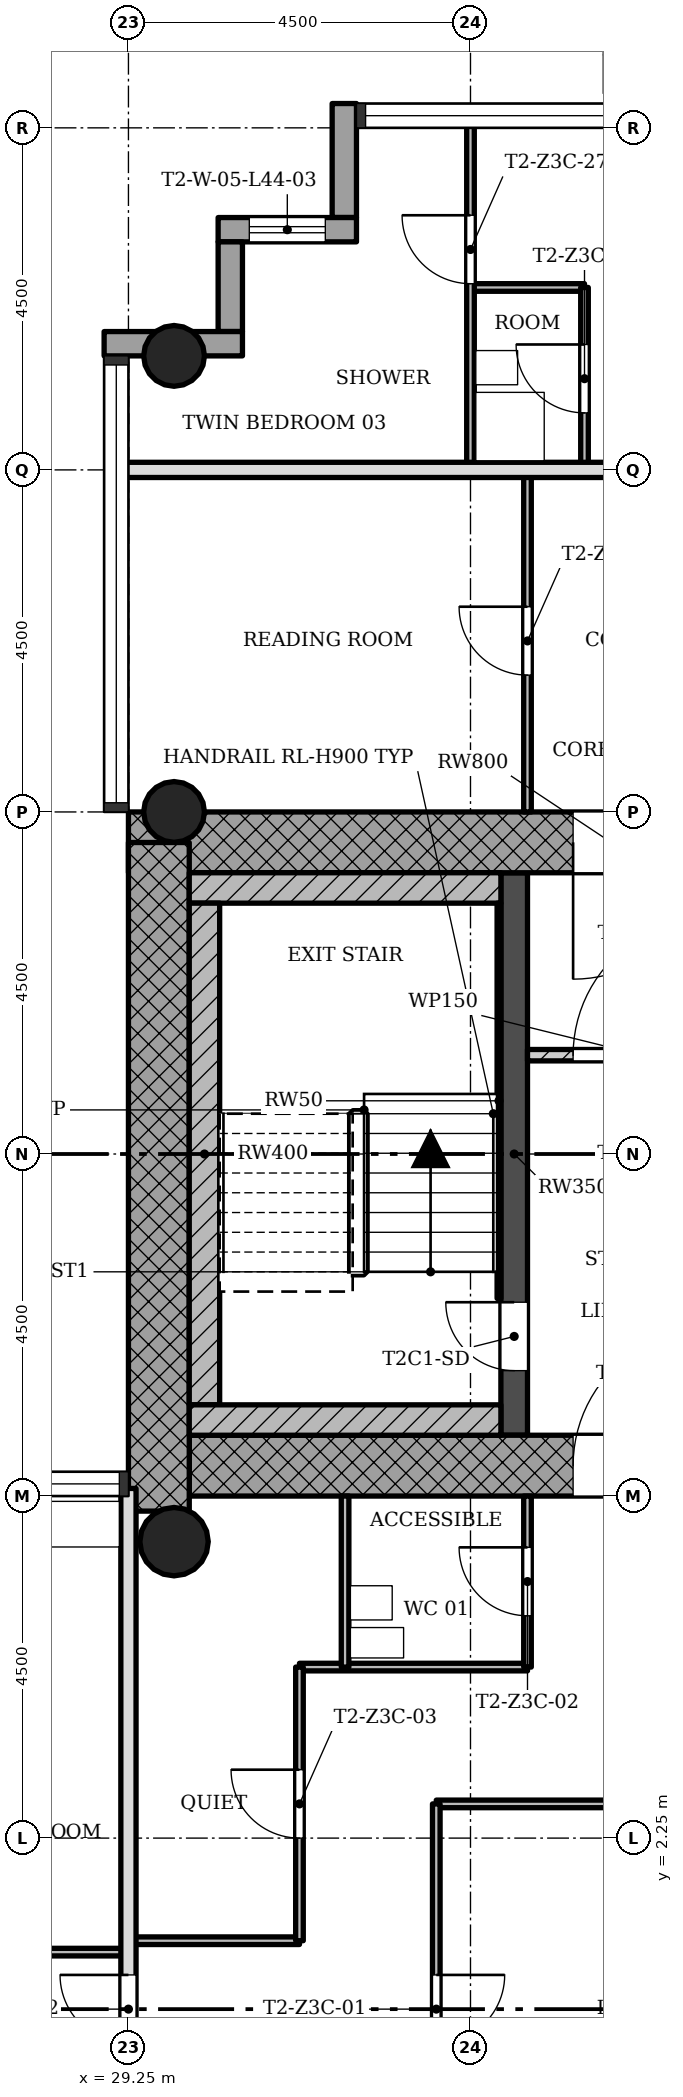
"""IFC4 building model, lengths in metres.
Left out: names, types, materials, properties, quantities, classifications, styles, units other than length and angle.
Written with IfcOpenShell. Run it as: python <this file> out.ifc"""

import sys

from ifc_helpers import new_model, si_unit, direction, frame, frame_2d, origin, origin_2d, place, context, subcontext, project, spatial, rectangle, hollow_circle, extrude, element, fill, save


model = new_model("IFC4")
c1 = context("Model", 3, precision=1e-05, world=origin(), true_north=direction((0.0, 1.0)))
c2 = subcontext(c1, "Body", "Model", "MODEL_VIEW")
j1 = project(units=[si_unit("LENGTHUNIT", "METRE"), si_unit("PLANEANGLEUNIT", "RADIAN")], contexts=[c1])
p1 = place(None, origin())
s1 = spatial("IfcSite", under=j1, at=p1, CompositionType="ELEMENT")
p2 = place(p1, origin())
s2 = spatial("IfcBuilding", under=s1, at=p2, CompositionType="ELEMENT")
p3 = place(p2, frame((0.0, 0.0, 160.9)))
s3 = spatial("IfcBuildingStorey", under=s2, at=p3, CompositionType="ELEMENT", Elevation=160.9)
p4 = place(p3, frame((30.05, 7.15, 0.0), z_axis=(0.0, 0.0, 1.0), x_axis=(1.0, 0.0, 0.0)))
e1 = element("IfcWall", 1, at=p4, inside=s3, PredefinedType="SHEAR", context=c2, shape_type="SweptSolid", body=[
    extrude(rectangle(XDim=12.7, YDim=0.8, at=frame_2d((6.35, 0.0))), origin(), (0.0, 0.0, 1.0), 3.4),
])
p5 = place(p4, frame((5.05, 0.0, 0.0)))
e2 = element("IfcOpeningElement", 2, at=p5, cuts=e1, PredefinedType="OPENING", context=c2, shape_type="SweptSolid", body=[
    extrude(rectangle(XDim=1.8, YDim=2.1, at=frame_2d((0.9, 1.05))), frame((0.0, 0.41, 0.0), z_axis=(0.0, -1.0, 0.0), x_axis=(1.0, 0.0, 0.0)), (0.0, 0.0, 1.0), 0.82),
])
p6 = place(p3, frame((41.95, 15.35, 0.0), z_axis=(0.0, 0.0, 1.0), x_axis=(-1.0, 0.0, 0.0)))
e3 = element("IfcWall", 3, at=p6, inside=s3, PredefinedType="SHEAR", context=c2, shape_type="SweptSolid", body=[
    extrude(rectangle(XDim=12.7, YDim=0.8, at=frame_2d((6.35, 0.0))), origin(), (0.0, 0.0, 1.0), 3.4),
])
p7 = place(p6, frame((5.05, 0.0, 0.0)))
e4 = element("IfcOpeningElement", 4, at=p7, cuts=e3, PredefinedType="OPENING", context=c2, shape_type="SweptSolid", body=[
    extrude(rectangle(XDim=1.8, YDim=2.1, at=frame_2d((0.9, 1.05))), frame((0.0, 0.41, 0.0), z_axis=(0.0, -1.0, 0.0), x_axis=(1.0, 0.0, 0.0)), (0.0, 0.0, 1.0), 0.82),
])
p8 = place(p3, frame((29.65, 15.348, 0.0), z_axis=(0.0, 0.0, 1.0), x_axis=(0.0, -1.0, 0.0)))
e5 = element("IfcWall", 5, at=p8, inside=s3, PredefinedType="SHEAR", context=c2, shape_type="SweptSolid", body=[
    extrude(rectangle(XDim=8.796, YDim=0.8, at=frame_2d((4.398, 0.0))), origin(), (0.0, 0.0, 1.0), 3.4),
])
p9 = place(p3, frame((34.325, 7.55, 0.0), z_axis=(0.0, 0.0, 1.0), x_axis=(0.0, 1.0, 0.0)))
e6 = element("IfcWall", 6, at=p9, inside=s3, PredefinedType="SHEAR", context=c2, shape_type="SweptSolid", body=[
    extrude(rectangle(XDim=7.4, YDim=0.35, at=frame_2d((3.7, 0.0))), origin(), (0.0, 0.0, 1.0), 3.4),
])
p10 = place(p9, frame((0.85, 0.0, 0.0)))
e7 = element("IfcOpeningElement", 7, at=p10, cuts=e6, PredefinedType="OPENING", context=c2, shape_type="SweptSolid", body=[
    extrude(rectangle(XDim=0.9, YDim=2.1, at=frame_2d((0.45, 1.05))), frame((0.0, 0.185, 0.0), z_axis=(0.0, -1.0, 0.0), x_axis=(1.0, 0.0, 0.0)), (0.0, 0.0, 1.0), 0.37),
])
for number, where, z_axis, x_axis in (
    (8, (29.85, 15.75, 0.0), (0.0, 0.0, 1.0), (1.0, 0.0, 0.0)),
    (9, (29.85, 21.75, 0.0), (0.0, 0.0, 1.0), (1.0, 0.0, 0.0)),
):
    element("IfcColumn", number, at=place(p3, frame(where, z_axis=z_axis, x_axis=x_axis)), inside=s3, PredefinedType="COLUMN", context=c2, shape_type="SweptSolid", body=[
        extrude(hollow_circle(Radius=0.4, WallThickness=0.028, at=origin_2d()), origin(), (0.0, 0.0, 1.0), 3.4),
    ])
p11 = place(p3, frame((29.85, 6.15, 0.0), z_axis=(0.0, 0.0, 1.0), x_axis=(1.0, 0.0, 0.0)))
e10 = element("IfcColumn", 10, at=p11, inside=s3, PredefinedType="COLUMN", context=c2, shape_type="SweptSolid", body=[
    extrude(hollow_circle(Radius=0.45, WallThickness=0.032, at=origin_2d()), origin(), (0.0, 0.0, 1.0), 3.4),
])
p12 = place(p3, frame((32.09, 25.07, -0.3), z_axis=(0.0, 0.0, 1.0), x_axis=(0.0, -1.0, 0.0)))
e11 = element("IfcWall", 11, at=p12, inside=s3, PredefinedType="STANDARD", context=c2, shape_type="SweptSolid", body=[
    extrude(rectangle(XDim=1.5, YDim=0.32, at=frame_2d((0.75, 0.0))), origin(), (0.0, 0.0, 1.0), 3.4),
])
p13 = place(p3, frame((32.25, 23.41, -0.3), z_axis=(0.0, 0.0, 1.0), x_axis=(-1.0, 0.0, 0.0)))
e12 = element("IfcWall", 12, at=p13, inside=s3, PredefinedType="STANDARD", context=c2, shape_type="SweptSolid", body=[
    extrude(rectangle(XDim=1.82, YDim=0.32, at=frame_2d((0.91, 0.0))), origin(), (0.0, 0.0, 1.0), 3.4),
])
p14 = place(p13, frame((0.41, 0.0, 1.2)))
e13 = element("IfcOpeningElement", 13, at=p14, cuts=e12, PredefinedType="OPENING", context=c2, shape_type="SweptSolid", body=[
    extrude(rectangle(XDim=1.0, YDim=1.5, at=frame_2d((0.5, 0.75))), frame((0.0, 0.17, 0.0), z_axis=(0.0, -1.0, 0.0), x_axis=(1.0, 0.0, 0.0)), (0.0, 0.0, 1.0), 0.34),
])
p15 = place(p3, frame((30.59, 23.25, -0.3), z_axis=(0.0, 0.0, 1.0), x_axis=(0.0, -1.0, 0.0)))
e14 = element("IfcWall", 14, at=p15, inside=s3, PredefinedType="STANDARD", context=c2, shape_type="SweptSolid", body=[
    extrude(rectangle(XDim=1.18, YDim=0.32, at=frame_2d((0.59, 0.0))), origin(), (0.0, 0.0, 1.0), 3.4),
])
p16 = place(p3, frame((30.75, 21.91, -0.3), z_axis=(0.0, 0.0, 1.0), x_axis=(-1.0, 0.0, 0.0)))
e15 = element("IfcWall", 15, at=p16, inside=s3, PredefinedType="STANDARD", context=c2, shape_type="SweptSolid", body=[
    extrude(rectangle(XDim=1.82, YDim=0.32, at=frame_2d((0.91, 0.0))), origin(), (0.0, 0.0, 1.0), 3.4),
])
p17 = place(p3, frame((37.5, 12.55, 0.0), z_axis=(0.0, 0.0, 1.0), x_axis=(-1.0, 0.0, 0.0)))
e16 = element("IfcWall", 16, at=p17, inside=s3, PredefinedType="PARTITIONING", context=c2, shape_type="SweptSolid", body=[
    extrude(rectangle(XDim=3.0, YDim=0.15, at=frame_2d((1.5, 0.0))), origin(), (0.0, 0.0, 1.0), 3.0),
])
p18 = place(p17, frame((0.6, 0.0, 0.0)))
e17 = element("IfcOpeningElement", 17, at=p18, cuts=e16, PredefinedType="OPENING", context=c2, shape_type="SweptSolid", body=[
    extrude(rectangle(XDim=1.8, YDim=2.1, at=frame_2d((0.9, 1.05))), frame((0.0, 0.085, 0.0), z_axis=(0.0, -1.0, 0.0), x_axis=(1.0, 0.0, 0.0)), (0.0, 0.0, 1.0), 0.17),
])
p19 = place(p3, frame((29.25, 0.75, 0.0), z_axis=(0.0, 0.0, 1.0), x_axis=(-1.0, 0.0, 0.0)))
e18 = element("IfcWall", 18, at=p19, inside=s3, PredefinedType="PARTITIONING", context=c2, shape_type="SweptSolid", body=[
    extrude(rectangle(XDim=4.5, YDim=0.1, at=frame_2d((2.25, 0.0))), origin(), (0.0, 0.0, 1.0), 3.0),
])
p20 = place(p19, frame((1.8, 0.0, 0.0)))
e19 = element("IfcOpeningElement", 19, at=p20, cuts=e18, PredefinedType="OPENING", context=c2, shape_type="SweptSolid", body=[
    extrude(rectangle(XDim=0.9, YDim=2.1, at=frame_2d((0.45, 1.05))), frame((0.0, 0.06, 0.0), z_axis=(0.0, -1.0, 0.0), x_axis=(1.0, 0.0, 0.0)), (0.0, 0.0, 1.0), 0.12),
])
p21 = place(p3, frame((31.5, 0.9, 0.0), z_axis=(0.0, 0.0, 1.0), x_axis=(-1.0, 0.0, 0.0)))
e20 = element("IfcWall", 20, at=p21, inside=s3, PredefinedType="PARTITIONING", context=c2, shape_type="SweptSolid", body=[
    extrude(rectangle(XDim=2.25, YDim=0.1, at=frame_2d((1.125, 0.0))), origin(), (0.0, 0.0, 1.0), 3.0),
])
p22 = place(p3, frame((38.7, 2.7, 0.0), z_axis=(0.0, 0.0, 1.0), x_axis=(-1.0, 0.0, 0.0)))
e21 = element("IfcWall", 21, at=p22, inside=s3, PredefinedType="PARTITIONING", context=c2, shape_type="SweptSolid", body=[
    extrude(rectangle(XDim=5.4, YDim=0.1, at=frame_2d((2.7, 0.0))), origin(), (0.0, 0.0, 1.0), 3.0),
])
p23 = place(p3, frame((34.5, 4.5, 0.0), z_axis=(0.0, 0.0, 1.0), x_axis=(-1.0, 0.0, 0.0)))
e22 = element("IfcWall", 22, at=p23, inside=s3, PredefinedType="PARTITIONING", context=c2, shape_type="SweptSolid", body=[
    extrude(rectangle(XDim=3.0, YDim=0.1, at=frame_2d((1.5, 0.0))), origin(), (0.0, 0.0, 1.0), 3.0),
])
p24 = place(p3, frame((42.85, 20.25, 0.0), z_axis=(0.0, 0.0, 1.0), x_axis=(-1.0, 0.0, 0.0)))
e23 = element("IfcWall", 23, at=p24, inside=s3, PredefinedType="SOLIDWALL", context=c2, shape_type="SweptSolid", body=[
    extrude(rectangle(XDim=13.7, YDim=0.2, at=frame_2d((6.85, 0.0))), origin(), (0.0, 0.0, 1.0), 3.0),
])
p25 = place(p24, frame((6.4, 0.0, 0.0)))
e24 = element("IfcOpeningElement", 24, at=p25, cuts=e23, PredefinedType="OPENING", context=c2, shape_type="SweptSolid", body=[
    extrude(rectangle(XDim=0.9, YDim=2.1, at=frame_2d((0.45, 1.05))), frame((0.0, 0.11, 0.0), z_axis=(0.0, -1.0, 0.0), x_axis=(1.0, 0.0, 0.0)), (0.0, 0.0, 1.0), 0.22),
])
p26 = place(p3, frame((35.25, 22.65, 0.0), z_axis=(0.0, 0.0, 1.0), x_axis=(-1.0, 0.0, 0.0)))
e25 = element("IfcWall", 25, at=p26, inside=s3, PredefinedType="PARTITIONING", context=c2, shape_type="SweptSolid", body=[
    extrude(rectangle(XDim=1.5, YDim=0.1, at=frame_2d((0.75, 0.0))), origin(), (0.0, 0.0, 1.0), 3.0),
])
p27 = place(p3, frame((35.25, 20.25, 0.0), z_axis=(0.0, 0.0, 1.0), x_axis=(0.0, 1.0, 0.0)))
e26 = element("IfcWall", 26, at=p27, inside=s3, PredefinedType="PARTITIONING", context=c2, shape_type="SweptSolid", body=[
    extrude(rectangle(XDim=2.4, YDim=0.1, at=frame_2d((1.2, 0.0))), origin(), (0.0, 0.0, 1.0), 3.0),
])
p28 = place(p27, frame((0.75, 0.0, 0.0)))
e27 = element("IfcOpeningElement", 27, at=p28, cuts=e26, PredefinedType="OPENING", context=c2, shape_type="SweptSolid", body=[
    extrude(rectangle(XDim=0.9, YDim=2.1, at=frame_2d((0.45, 1.05))), frame((0.0, 0.06, 0.0), z_axis=(0.0, -1.0, 0.0), x_axis=(1.0, 0.0, 0.0)), (0.0, 0.0, 1.0), 0.12),
])
p29 = place(p3, frame((34.5, 4.5, 0.0), z_axis=(0.0, 0.0, 1.0), x_axis=(0.0, 1.0, 0.0)))
e28 = element("IfcWall", 28, at=p29, inside=s3, PredefinedType="PARTITIONING", context=c2, shape_type="SweptSolid", body=[
    extrude(rectangle(XDim=2.25, YDim=0.1, at=frame_2d((1.125, 0.0))), origin(), (0.0, 0.0, 1.0), 3.0),
])
p30 = place(p29, frame((0.675, 0.0, 0.0)))
e29 = element("IfcOpeningElement", 29, at=p30, cuts=e28, PredefinedType="OPENING", context=c2, shape_type="SweptSolid", body=[
    extrude(rectangle(XDim=0.9, YDim=2.1, at=frame_2d((0.45, 1.05))), frame((0.0, 0.06, 0.0), z_axis=(0.0, -1.0, 0.0), x_axis=(1.0, 0.0, 0.0)), (0.0, 0.0, 1.0), 0.12),
])
p31 = place(p3, frame((34.5, 15.75, 0.0), z_axis=(0.0, 0.0, 1.0), x_axis=(0.0, 1.0, 0.0)))
e30 = element("IfcWall", 30, at=p31, inside=s3, PredefinedType="PARTITIONING", context=c2, shape_type="SweptSolid", body=[
    extrude(rectangle(XDim=4.5, YDim=0.1, at=frame_2d((2.25, 0.0))), origin(), (0.0, 0.0, 1.0), 3.0),
])
p32 = place(p31, frame((1.8, 0.0, 0.0)))
e31 = element("IfcOpeningElement", 31, at=p32, cuts=e30, PredefinedType="OPENING", context=c2, shape_type="SweptSolid", body=[
    extrude(rectangle(XDim=0.9, YDim=2.1, at=frame_2d((0.45, 1.05))), frame((0.0, 0.06, 0.0), z_axis=(0.0, -1.0, 0.0), x_axis=(1.0, 0.0, 0.0)), (0.0, 0.0, 1.0), 0.12),
])
p33 = place(p3, frame((33.75, 20.25, 0.0), z_axis=(0.0, 0.0, 1.0), x_axis=(0.0, 1.0, 0.0)))
e32 = element("IfcWall", 32, at=p33, inside=s3, PredefinedType="PARTITIONING", context=c2, shape_type="SweptSolid", body=[
    extrude(rectangle(XDim=4.6, YDim=0.1, at=frame_2d((2.3, 0.0))), origin(), (0.0, 0.0, 1.0), 3.0),
])
p34 = place(p33, frame((2.45, 0.0, 0.0)))
e33 = element("IfcOpeningElement", 33, at=p34, cuts=e32, PredefinedType="OPENING", context=c2, shape_type="SweptSolid", body=[
    extrude(rectangle(XDim=0.9, YDim=2.1, at=frame_2d((0.45, 1.05))), frame((0.0, 0.06, 0.0), z_axis=(0.0, -1.0, 0.0), x_axis=(1.0, 0.0, 0.0)), (0.0, 0.0, 1.0), 0.12),
])
p35 = place(p3, frame((33.3, -2.7, 0.0), z_axis=(0.0, 0.0, 1.0), x_axis=(0.0, 1.0, 0.0)))
e34 = element("IfcWall", 34, at=p35, inside=s3, PredefinedType="PARTITIONING", context=c2, shape_type="SweptSolid", body=[
    extrude(rectangle(XDim=5.4, YDim=0.1, at=frame_2d((2.7, 0.0))), origin(), (0.0, 0.0, 1.0), 3.0),
])
p36 = place(p35, frame((2.25, 0.0, 0.0)))
e35 = element("IfcOpeningElement", 35, at=p36, cuts=e34, PredefinedType="OPENING", context=c2, shape_type="SweptSolid", body=[
    extrude(rectangle(XDim=0.9, YDim=2.1, at=frame_2d((0.45, 1.05))), frame((0.0, 0.06, 0.0), z_axis=(0.0, -1.0, 0.0), x_axis=(1.0, 0.0, 0.0)), (0.0, 0.0, 1.0), 0.12),
])
p37 = place(p3, frame((32.1, 4.5, 0.0), z_axis=(0.0, 0.0, 1.0), x_axis=(0.0, 1.0, 0.0)))
e36 = element("IfcWall", 36, at=p37, inside=s3, PredefinedType="PARTITIONING", context=c2, shape_type="SweptSolid", body=[
    extrude(rectangle(XDim=2.25, YDim=0.1, at=frame_2d((1.125, 0.0))), origin(), (0.0, 0.0, 1.0), 3.0),
])
p38 = place(p3, frame((31.5, 0.9, 0.0), z_axis=(0.0, 0.0, 1.0), x_axis=(0.0, 1.0, 0.0)))
e37 = element("IfcWall", 37, at=p38, inside=s3, PredefinedType="PARTITIONING", context=c2, shape_type="SweptSolid", body=[
    extrude(rectangle(XDim=3.6, YDim=0.1, at=frame_2d((1.8, 0.0))), origin(), (0.0, 0.0, 1.0), 3.0),
])
p39 = place(p38, frame((1.35, 0.0, 0.0)))
e38 = element("IfcOpeningElement", 38, at=p39, cuts=e37, PredefinedType="OPENING", context=c2, shape_type="SweptSolid", body=[
    extrude(rectangle(XDim=0.9, YDim=2.1, at=frame_2d((0.45, 1.05))), frame((0.0, 0.06, 0.0), z_axis=(0.0, -1.0, 0.0), x_axis=(1.0, 0.0, 0.0)), (0.0, 0.0, 1.0), 0.12),
])
p40 = place(p3, frame((29.25, -6.85, 0.0), z_axis=(0.0, 0.0, 1.0), x_axis=(0.0, 1.0, 0.0)))
e39 = element("IfcWall", 39, at=p40, inside=s3, PredefinedType="SOLIDWALL", context=c2, shape_type="SweptSolid", body=[
    extrude(rectangle(XDim=13.7, YDim=0.2, at=frame_2d((6.85, 0.0))), origin(), (0.0, 0.0, 1.0), 3.0),
])
p41 = place(p40, frame((6.4, 0.0, 0.0)))
e40 = element("IfcOpeningElement", 40, at=p41, cuts=e39, PredefinedType="OPENING", context=c2, shape_type="SweptSolid", body=[
    extrude(rectangle(XDim=0.9, YDim=2.1, at=frame_2d((0.45, 1.05))), frame((0.0, 0.11, 0.0), z_axis=(0.0, -1.0, 0.0), x_axis=(1.0, 0.0, 0.0)), (0.0, 0.0, 1.0), 0.22),
])
p42 = place(p3, frame((34.15, 14.75, 0.0), z_axis=(0.0, 0.0, 1.0), x_axis=(-1.0, 0.0, 0.0)))
e41 = element("IfcWall", 41, at=p42, inside=s3, PredefinedType="SHEAR", context=c2, shape_type="SweptSolid", body=[
    extrude(rectangle(XDim=4.1, YDim=0.4, at=frame_2d((2.05, 0.0))), origin(), (0.0, 0.0, 1.0), 3.4),
])
p43 = place(p3, frame((30.25, 7.95, 0.0), z_axis=(0.0, 0.0, 1.0), x_axis=(0.0, 1.0, 0.0)))
e42 = element("IfcWall", 42, at=p43, inside=s3, PredefinedType="SHEAR", context=c2, shape_type="SweptSolid", body=[
    extrude(rectangle(XDim=6.6, YDim=0.4, at=frame_2d((3.3, 0.0))), origin(), (0.0, 0.0, 1.0), 3.4),
])
p44 = place(p3, frame((34.15, 7.75, 0.0), z_axis=(0.0, 0.0, 1.0), x_axis=(-1.0, 0.0, 0.0)))
e43 = element("IfcWall", 43, at=p44, inside=s3, PredefinedType="SHEAR", context=c2, shape_type="SweptSolid", body=[
    extrude(rectangle(XDim=4.1, YDim=0.4, at=frame_2d((2.05, 0.0))), origin(), (0.0, 0.0, 1.0), 3.4),
])
p45 = place(p3, frame((34.125, 9.35, 0.0), z_axis=(0.0, 0.0, 1.0), x_axis=(0.0, 1.0, 0.0)))
e44 = element("IfcWall", 44, at=p45, inside=s3, PredefinedType="SHEAR", context=c2, shape_type="SweptSolid", body=[
    extrude(rectangle(XDim=5.2, YDim=0.05, at=frame_2d((2.6, 0.0))), origin(), (0.0, 0.0, 1.0), 3.4),
])
p46 = place(p18, origin())
e45 = element("IfcDoor", 45, at=p46, inside=s3, OperationType="SINGLE_SWING_LEFT", PredefinedType="DOOR", context=c2, shape_type="SweptSolid", body=[
    extrude(rectangle(XDim=1.8, YDim=2.1, at=frame_2d((0.9, 1.05))), frame((0.0, 0.025, 0.0), z_axis=(0.0, -1.0, 0.0), x_axis=(1.0, 0.0, 0.0)), (0.0, 0.0, 1.0), 0.05),
])
fill(e17, e45)
p47 = place(p36, origin())
e46 = element("IfcDoor", 46, at=p47, inside=s3, OperationType="SINGLE_SWING_RIGHT", PredefinedType="DOOR", context=c2, shape_type="SweptSolid", body=[
    extrude(rectangle(XDim=0.9, YDim=2.1, at=frame_2d((0.45, 1.05))), frame((0.0, 0.025, 0.0), z_axis=(0.0, -1.0, 0.0), x_axis=(1.0, 0.0, 0.0)), (0.0, 0.0, 1.0), 0.05),
])
fill(e35, e46)
p48 = place(p30, origin())
e47 = element("IfcDoor", 47, at=p48, inside=s3, OperationType="SINGLE_SWING_LEFT", PredefinedType="DOOR", context=c2, shape_type="SweptSolid", body=[
    extrude(rectangle(XDim=0.9, YDim=2.1, at=frame_2d((0.45, 1.05))), frame((0.0, 0.025, 0.0), z_axis=(0.0, -1.0, 0.0), x_axis=(1.0, 0.0, 0.0)), (0.0, 0.0, 1.0), 0.05),
])
fill(e29, e47)
p49 = place(p39, origin())
e48 = element("IfcDoor", 48, at=p49, inside=s3, OperationType="SINGLE_SWING_LEFT", PredefinedType="DOOR", context=c2, shape_type="SweptSolid", body=[
    extrude(rectangle(XDim=0.9, YDim=2.1, at=frame_2d((0.45, 1.05))), frame((0.0, 0.025, 0.0), z_axis=(0.0, -1.0, 0.0), x_axis=(1.0, 0.0, 0.0)), (0.0, 0.0, 1.0), 0.05),
])
fill(e38, e48)
p50 = place(p41, origin())
e49 = element("IfcDoor", 49, at=p50, inside=s3, OperationType="SINGLE_SWING_LEFT", PredefinedType="DOOR", context=c2, shape_type="SweptSolid", body=[
    extrude(rectangle(XDim=0.9, YDim=2.1, at=frame_2d((0.45, 1.05))), frame((0.0, 0.025, 0.0), z_axis=(0.0, -1.0, 0.0), x_axis=(1.0, 0.0, 0.0)), (0.0, 0.0, 1.0), 0.05),
])
fill(e40, e49)
p51 = place(p32, origin())
e50 = element("IfcDoor", 50, at=p51, inside=s3, OperationType="SINGLE_SWING_LEFT", PredefinedType="DOOR", context=c2, shape_type="SweptSolid", body=[
    extrude(rectangle(XDim=0.9, YDim=2.1, at=frame_2d((0.45, 1.05))), frame((0.0, 0.025, 0.0), z_axis=(0.0, -1.0, 0.0), x_axis=(1.0, 0.0, 0.0)), (0.0, 0.0, 1.0), 0.05),
])
fill(e31, e50)
p52 = place(p28, origin())
e51 = element("IfcDoor", 51, at=p52, inside=s3, OperationType="SINGLE_SWING_LEFT", PredefinedType="DOOR", context=c2, shape_type="SweptSolid", body=[
    extrude(rectangle(XDim=0.9, YDim=2.1, at=frame_2d((0.45, 1.05))), frame((0.0, 0.025, 0.0), z_axis=(0.0, -1.0, 0.0), x_axis=(1.0, 0.0, 0.0)), (0.0, 0.0, 1.0), 0.05),
])
fill(e27, e51)
p53 = place(p34, origin())
e52 = element("IfcDoor", 52, at=p53, inside=s3, OperationType="SINGLE_SWING_LEFT", PredefinedType="DOOR", context=c2, shape_type="SweptSolid", body=[
    extrude(rectangle(XDim=0.9, YDim=2.1, at=frame_2d((0.45, 1.05))), frame((0.0, 0.025, 0.0), z_axis=(0.0, -1.0, 0.0), x_axis=(1.0, 0.0, 0.0)), (0.0, 0.0, 1.0), 0.05),
])
fill(e33, e52)
p54 = place(p10, origin())
e53 = element("IfcDoor", 53, at=p54, inside=s3, OperationType="SINGLE_SWING_LEFT", PredefinedType="DOOR", context=c2, shape_type="SweptSolid", body=[
    extrude(rectangle(XDim=0.9, YDim=2.1, at=frame_2d((0.45, 1.05))), frame((0.0, 0.025, 0.0), z_axis=(0.0, -1.0, 0.0), x_axis=(1.0, 0.0, 0.0)), (0.0, 0.0, 1.0), 0.05),
])
fill(e7, e53)
p55 = place(p5, origin())
e54 = element("IfcDoor", 54, at=p55, inside=s3, OperationType="SINGLE_SWING_LEFT", PredefinedType="DOOR", context=c2, shape_type="SweptSolid", body=[
    extrude(rectangle(XDim=1.8, YDim=2.1, at=frame_2d((0.9, 1.05))), frame((0.0, 0.025, 0.0), z_axis=(0.0, -1.0, 0.0), x_axis=(1.0, 0.0, 0.0)), (0.0, 0.0, 1.0), 0.05),
])
fill(e2, e54)
p56 = place(p7, origin())
e55 = element("IfcDoor", 55, at=p56, inside=s3, OperationType="SINGLE_SWING_LEFT", PredefinedType="DOOR", context=c2, shape_type="SweptSolid", body=[
    extrude(rectangle(XDim=1.8, YDim=2.1, at=frame_2d((0.9, 1.05))), frame((0.0, 0.025, 0.0), z_axis=(0.0, -1.0, 0.0), x_axis=(1.0, 0.0, 0.0)), (0.0, 0.0, 1.0), 0.05),
])
fill(e4, e55)
p57 = place(p14, origin())
e56 = element("IfcWindow", 56, at=p57, inside=s3, PartitioningType="SINGLE_PANEL", PredefinedType="WINDOW", context=c2, shape_type="SweptSolid", body=[
    extrude(rectangle(XDim=1.0, YDim=1.5, at=frame_2d((0.5, 0.75))), frame((0.0, 0.03, 0.0), z_axis=(0.0, -1.0, 0.0), x_axis=(1.0, 0.0, 0.0)), (0.0, 0.0, 1.0), 0.06),
])
fill(e13, e56)
save(model, sys.argv[1])
